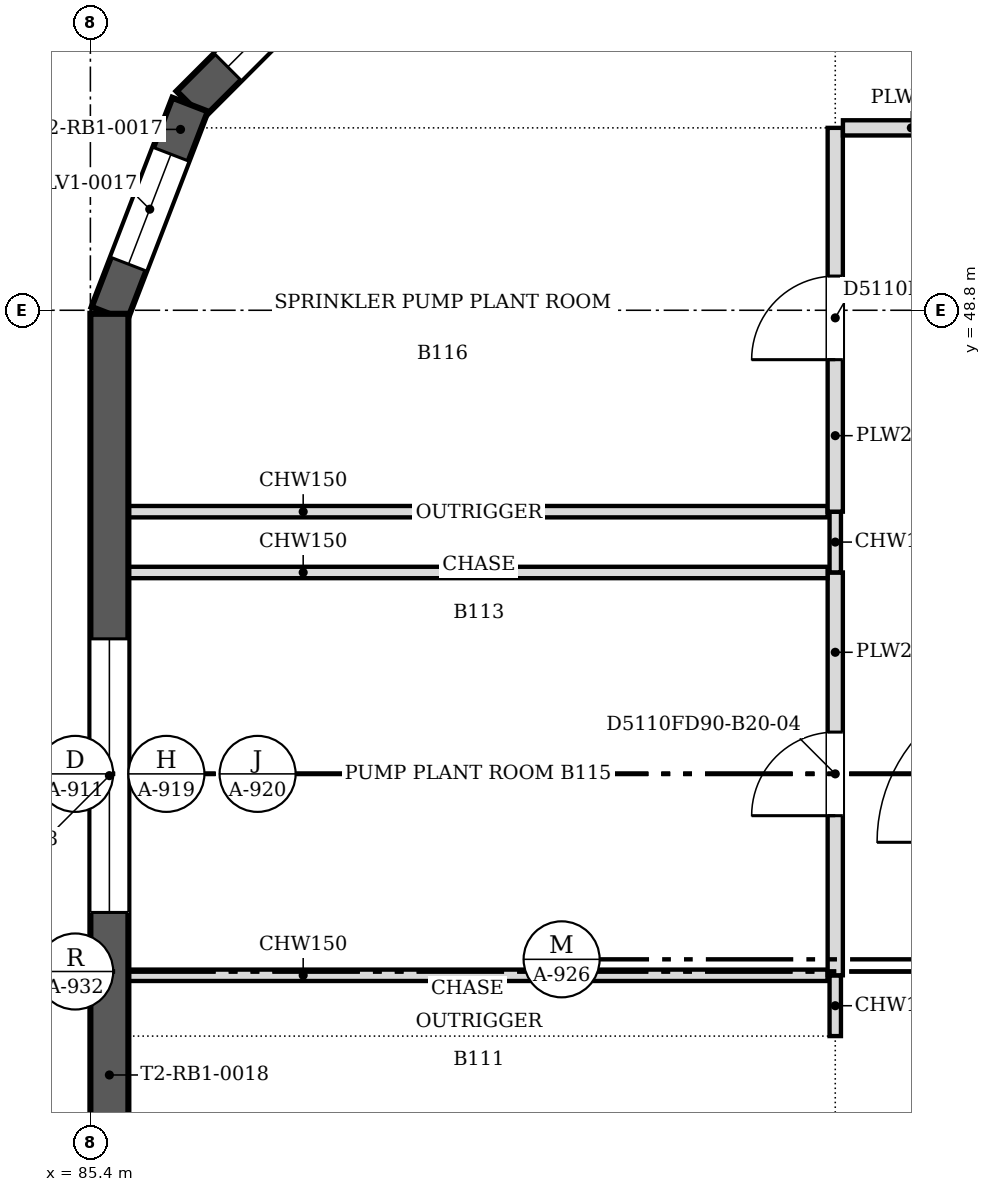
"""IFC4 building model, lengths in metres.
Left out: names, types, materials, properties, quantities, classifications, styles, units other than length and angle.
Written with IfcOpenShell. Run it as: python <this file> out.ifc"""

import sys

from ifc_helpers import new_model, si_unit, direction, frame, frame_2d, origin, place, context, subcontext, project, spatial, polyline, rectangle, outline, extrude, faceted_brep, source, transform, mapped, element, fill, save


model = new_model("IFC4")
c1 = context("Model", 3, precision=1e-05, world=origin(), true_north=direction((0.0, 1.0)))
c2 = subcontext(c1, "Body", "Model", "MODEL_VIEW")
j1 = project(units=[si_unit("LENGTHUNIT", "METRE"), si_unit("PLANEANGLEUNIT", "RADIAN")], contexts=[c1])
p1 = place(None, origin())
s1 = spatial("IfcSite", under=j1, at=p1, CompositionType="ELEMENT")
p2 = place(p1, origin())
s2 = spatial("IfcBuilding", under=s1, at=p2, CompositionType="ELEMENT")
p3 = place(p2, frame((0.0, 0.0, 63.8)))
s3 = spatial("IfcBuildingStorey", under=s2, at=p3, CompositionType="ELEMENT", Elevation=63.8)
m1 = source(origin(), c2, "Body", "Brep", [
    faceted_brep([(0.0, -0.25, 0.0), (2.944, -0.25, 0.0), (2.944, -0.25, 4.8), (0.0, -0.25, 4.8), (0.053, 0.25, 4.8), (2.891, 0.25, 4.8), (2.891, 0.25, 0.0), (0.053, 0.25, 0.0), (2.944, 0.0, 0.0), (0.0, 0.0, 0.0), (2.944, 0.0, 4.8), (0.0, 0.0, 4.8)], [[[0, 1, 2, 3]], [[4, 5, 6, 7]], [[7, 6, 8, 1, 0, 9]], [[10, 2, 1, 8]], [[5, 4, 11, 3, 2, 10]], [[9, 0, 3, 11]], [[7, 9, 11, 4]], [[8, 6, 5, 10]]]),
])
p4 = place(p3, frame((88.794, 53.588, 0.0), z_axis=(0.0, 0.0, 1.0), x_axis=(-0.707106781187, -0.707106781187, 0.0)))
e1 = element("IfcWall", 1, at=p4, inside=s3, PredefinedType="SOLIDWALL", context=c2, shape_type="MappedRepresentation", body=[
    mapped(m1, transform((0.0, 0.0, 0.0), scale=1.0)),
])
m2 = source(origin(), c2, "Body", "SweptSolid", [
    extrude(outline(polyline([(0.7, 0.8), (2.244, 0.8), (2.244, 4.0), (0.7, 4.0), (0.7, 0.8)])), frame((0.0, 0.26, 0.0), z_axis=(0.0, -1.0, 0.0), x_axis=(1.0, 0.0, 0.0)), (0.0, 0.0, 1.0), 0.52),
])
p5 = place(p4, origin())
e2 = element("IfcOpeningElement", 2, at=p5, cuts=e1, PredefinedType="OPENING", context=c2, shape_type="MappedRepresentation", body=[
    mapped(m2, transform((0.0, 0.0, 0.0), scale=1.0)),
])
m3 = source(origin(), c2, "Body", "Brep", [
    faceted_brep([(0.0, -0.25, 0.0), (2.95, -0.25, 0.0), (2.95, -0.25, 4.8), (0.0, -0.25, 4.8), (0.053, 0.25, 4.8), (2.904, 0.25, 4.8), (2.904, 0.25, 0.0), (0.053, 0.25, 0.0), (2.95, 0.0, 0.0), (0.0, 0.0, 0.0), (2.95, 0.0, 4.8), (0.0, 0.0, 4.8)], [[[0, 1, 2, 3]], [[4, 5, 6, 7]], [[7, 6, 8, 1, 0, 9]], [[10, 2, 1, 8]], [[5, 4, 11, 3, 2, 10]], [[9, 0, 3, 11]], [[7, 9, 11, 4]], [[8, 6, 5, 10]]]),
])
p6 = place(p3, frame((86.712, 51.506, 0.0), z_axis=(0.0, 0.0, 1.0), x_axis=(-0.359849431015, -0.933010389544, 0.0)))
e3 = element("IfcWall", 3, at=p6, inside=s3, PredefinedType="SOLIDWALL", context=c2, shape_type="MappedRepresentation", body=[
    mapped(m3, transform((0.0, 0.0, 0.0), scale=1.0)),
])
m4 = source(origin(), c2, "Body", "SweptSolid", [
    extrude(outline(polyline([(0.7, 0.8), (2.25, 0.8), (2.25, 4.0), (0.7, 4.0), (0.7, 0.8)])), frame((0.0, 0.26, 0.0), z_axis=(0.0, -1.0, 0.0), x_axis=(1.0, 0.0, 0.0)), (0.0, 0.0, 1.0), 0.52),
])
p7 = place(p6, origin())
e4 = element("IfcOpeningElement", 4, at=p7, cuts=e3, PredefinedType="OPENING", context=c2, shape_type="MappedRepresentation", body=[
    mapped(m4, transform((0.0, 0.0, 0.0), scale=1.0)),
])
m5 = source(origin(), c2, "Body", "Brep", [
    faceted_brep([(0.0, -0.25, 0.0), (12.154, -0.25, 0.0), (12.154, -0.25, 4.8), (0.0, -0.25, 4.8), (0.047, 0.25, 4.8), (12.154, 0.25, 4.8), (12.154, 0.25, 0.0), (0.047, 0.25, 0.0), (0.0, 0.0, 0.0), (0.0, 0.0, 4.8)], [[[0, 1, 2, 3]], [[4, 5, 6, 7]], [[7, 6, 1, 0, 8]], [[5, 4, 9, 3, 2]], [[8, 0, 3, 9]], [[7, 8, 9, 4]], [[1, 6, 5, 2]]]),
])
p8 = place(p3, frame((85.65, 48.753, 0.0), z_axis=(0.0, 0.0, 1.0), x_axis=(0.0, -1.0, 0.0)))
e5 = element("IfcWall", 5, at=p8, inside=s3, PredefinedType="SOLIDWALL", context=c2, shape_type="MappedRepresentation", body=[
    mapped(m5, transform((0.0, 0.0, 0.0), scale=1.0)),
])
m6 = source(origin(), c2, "Body", "SweptSolid", [
    extrude(outline(polyline([(4.277, 0.8), (7.877, 0.8), (7.877, 4.0), (4.277, 4.0), (4.277, 0.8)])), frame((0.0, 0.26, 0.0), z_axis=(0.0, -1.0, 0.0), x_axis=(1.0, 0.0, 0.0)), (0.0, 0.0, 1.0), 0.52),
])
p9 = place(p8, origin())
e6 = element("IfcOpeningElement", 6, at=p9, cuts=e5, PredefinedType="OPENING", context=c2, shape_type="MappedRepresentation", body=[
    mapped(m6, transform((0.0, 0.0, 0.0), scale=1.0)),
])
p10 = place(p3, frame((95.2, 39.25, 0.0), z_axis=(0.0, 0.0, 1.0), x_axis=(0.0, 1.0, 0.0)))
e7 = element("IfcWall", 7, at=p10, inside=s3, PredefinedType="PARTITIONING", context=c2, shape_type="SweptSolid", body=[
    extrude(rectangle(XDim=0.799, YDim=0.15, at=frame_2d((0.399, 0.0))), origin(), (0.0, 0.0, 1.0), 4.067),
])
p11 = place(p3, frame((85.9, 40.05, 0.0), z_axis=(0.0, 0.0, 1.0), x_axis=(1.0, 0.0, 0.0)))
e8 = element("IfcWall", 8, at=p11, inside=s3, PredefinedType="PARTITIONING", context=c2, shape_type="SweptSolid", body=[
    extrude(rectangle(XDim=9.199, YDim=0.15, at=frame_2d((4.6, 0.0))), origin(), (0.0, 0.0, 1.0), 4.067),
])
p12 = place(p3, frame((95.2, 40.05, 0.0), z_axis=(0.0, 0.0, 1.0), x_axis=(0.0, 1.0, 0.0)))
e9 = element("IfcWall", 9, at=p12, inside=s3, PredefinedType="PARTITIONING", context=c2, shape_type="SweptSolid", body=[
    extrude(rectangle(XDim=5.3, YDim=0.2, at=frame_2d((2.65, 0.0))), origin(), (0.0, 0.0, 1.0), 4.067),
])
m7 = source(origin(), c2, "Body", "SweptSolid", [
    extrude(rectangle(XDim=1.1, YDim=2.1, at=frame_2d((0.55, 1.05))), frame((0.0, 0.11, 0.0), z_axis=(0.0, -1.0, 0.0), x_axis=(1.0, 0.0, 0.0)), (0.0, 0.0, 1.0), 0.22),
])
p13 = place(p12, frame((2.1, 0.0, 0.0)))
e10 = element("IfcOpeningElement", 10, at=p13, cuts=e9, PredefinedType="OPENING", context=c2, shape_type="MappedRepresentation", body=[
    mapped(m7, transform((0.0, 0.0, 0.0), scale=1.0)),
])
p14 = place(p3, frame((85.9, 45.35, 0.0), z_axis=(0.0, 0.0, 1.0), x_axis=(1.0, 0.0, 0.0)))
e11 = element("IfcWall", 11, at=p14, inside=s3, PredefinedType="PARTITIONING", context=c2, shape_type="SweptSolid", body=[
    extrude(rectangle(XDim=9.199, YDim=0.15, at=frame_2d((4.6, 0.0))), origin(), (0.0, 0.0, 1.0), 4.067),
])
p15 = place(p3, frame((95.2, 45.351, 0.0), z_axis=(0.0, 0.0, 1.0), x_axis=(0.0, 1.0, 0.0)))
e12 = element("IfcWall", 12, at=p15, inside=s3, PredefinedType="PARTITIONING", context=c2, shape_type="SweptSolid", body=[
    extrude(rectangle(XDim=0.798, YDim=0.15, at=frame_2d((0.399, 0.0))), origin(), (0.0, 0.0, 1.0), 4.067),
])
p16 = place(p3, frame((85.9, 46.15, 0.0), z_axis=(0.0, 0.0, 1.0), x_axis=(1.0, 0.0, 0.0)))
e13 = element("IfcWall", 13, at=p16, inside=s3, PredefinedType="PARTITIONING", context=c2, shape_type="SweptSolid", body=[
    extrude(rectangle(XDim=9.199, YDim=0.15, at=frame_2d((4.6, 0.0))), origin(), (0.0, 0.0, 1.0), 4.067),
])
p17 = place(p3, frame((95.2, 46.15, 0.0), z_axis=(0.0, 0.0, 1.0), x_axis=(0.0, 1.0, 0.0)))
e14 = element("IfcWall", 14, at=p17, inside=s3, PredefinedType="PARTITIONING", context=c2, shape_type="SweptSolid", body=[
    extrude(rectangle(XDim=5.05, YDim=0.2, at=frame_2d((2.525, 0.0))), origin(), (0.0, 0.0, 1.0), 4.067),
])
p18 = place(p17, frame((2.0, 0.0, 0.0)))
e15 = element("IfcOpeningElement", 15, at=p18, cuts=e14, PredefinedType="OPENING", context=c2, shape_type="MappedRepresentation", body=[
    mapped(m7, transform((0.0, 0.0, 0.0), scale=1.0)),
])
p19 = place(p3, frame((95.301, 51.2, 0.0), z_axis=(0.0, 0.0, 1.0), x_axis=(1.0, 0.0, 0.0)))
e16 = element("IfcWall", 16, at=p19, inside=s3, PredefinedType="PARTITIONING", context=c2, shape_type="SweptSolid", body=[
    extrude(rectangle(XDim=4.699, YDim=0.2, at=frame_2d((2.35, 0.0))), origin(), (0.0, 0.0, 1.0), 4.067),
])
p20 = place(p19, frame((1.8, 0.0, 0.0)))
e17 = element("IfcOpeningElement", 17, at=p20, cuts=e16, PredefinedType="OPENING", context=c2, shape_type="MappedRepresentation", body=[
    mapped(m7, transform((0.0, 0.0, 0.0), scale=1.0)),
])
m8 = source(origin(), c2, "Body", "SweptSolid", [
    extrude(outline(polyline([(0.7, 0.8), (2.244, 0.8), (2.244, 4.0), (0.7, 4.0), (0.7, 0.8)])), frame((0.0, 0.03, 0.0), z_axis=(0.0, -1.0, 0.0), x_axis=(1.0, 0.0, 0.0)), (0.0, 0.0, 1.0), 0.06),
])
p21 = place(p5, origin())
e18 = element("IfcWindow", 18, at=p21, inside=s3, PartitioningType="USERDEFINED", PredefinedType="WINDOW", context=c2, shape_type="MappedRepresentation", body=[
    mapped(m8, transform((0.0, 0.0, 0.0), scale=1.0)),
])
fill(e2, e18)
m9 = source(origin(), c2, "Body", "SweptSolid", [
    extrude(outline(polyline([(0.7, 0.8), (2.25, 0.8), (2.25, 4.0), (0.7, 4.0), (0.7, 0.8)])), frame((0.0, 0.03, 0.0), z_axis=(0.0, -1.0, 0.0), x_axis=(1.0, 0.0, 0.0)), (0.0, 0.0, 1.0), 0.06),
])
p22 = place(p7, origin())
e19 = element("IfcWindow", 19, at=p22, inside=s3, PartitioningType="USERDEFINED", PredefinedType="WINDOW", context=c2, shape_type="MappedRepresentation", body=[
    mapped(m9, transform((0.0, 0.0, 0.0), scale=1.0)),
])
fill(e4, e19)
m10 = source(origin(), c2, "Body", "SweptSolid", [
    extrude(outline(polyline([(4.277, 0.8), (7.877, 0.8), (7.877, 4.0), (4.277, 4.0), (4.277, 0.8)])), frame((0.0, 0.03, 0.0), z_axis=(0.0, -1.0, 0.0), x_axis=(1.0, 0.0, 0.0)), (0.0, 0.0, 1.0), 0.06),
])
p23 = place(p9, origin())
e20 = element("IfcWindow", 20, at=p23, inside=s3, PartitioningType="USERDEFINED", PredefinedType="WINDOW", context=c2, shape_type="MappedRepresentation", body=[
    mapped(m10, transform((0.0, 0.0, 0.0), scale=1.0)),
])
fill(e6, e20)
m11 = source(origin(), c2, "Body", "SweptSolid", [
    extrude(rectangle(XDim=1.1, YDim=2.1, at=frame_2d((0.55, 1.05))), frame((0.0, 0.025, 0.0), z_axis=(0.0, -1.0, 0.0), x_axis=(1.0, 0.0, 0.0)), (0.0, 0.0, 1.0), 0.05),
])
p24 = place(p18, origin())
e21 = element("IfcDoor", 21, at=p24, inside=s3, OperationType="SINGLE_SWING_LEFT", PredefinedType="DOOR", context=c2, shape_type="MappedRepresentation", body=[
    mapped(m11, transform((0.0, 0.0, 0.0), scale=1.0)),
])
fill(e15, e21)
p25 = place(p13, origin())
e22 = element("IfcDoor", 22, at=p25, inside=s3, OperationType="SINGLE_SWING_LEFT", PredefinedType="DOOR", context=c2, shape_type="MappedRepresentation", body=[
    mapped(m11, transform((0.0, 0.0, 0.0), scale=1.0)),
])
fill(e10, e22)
save(model, sys.argv[1])
